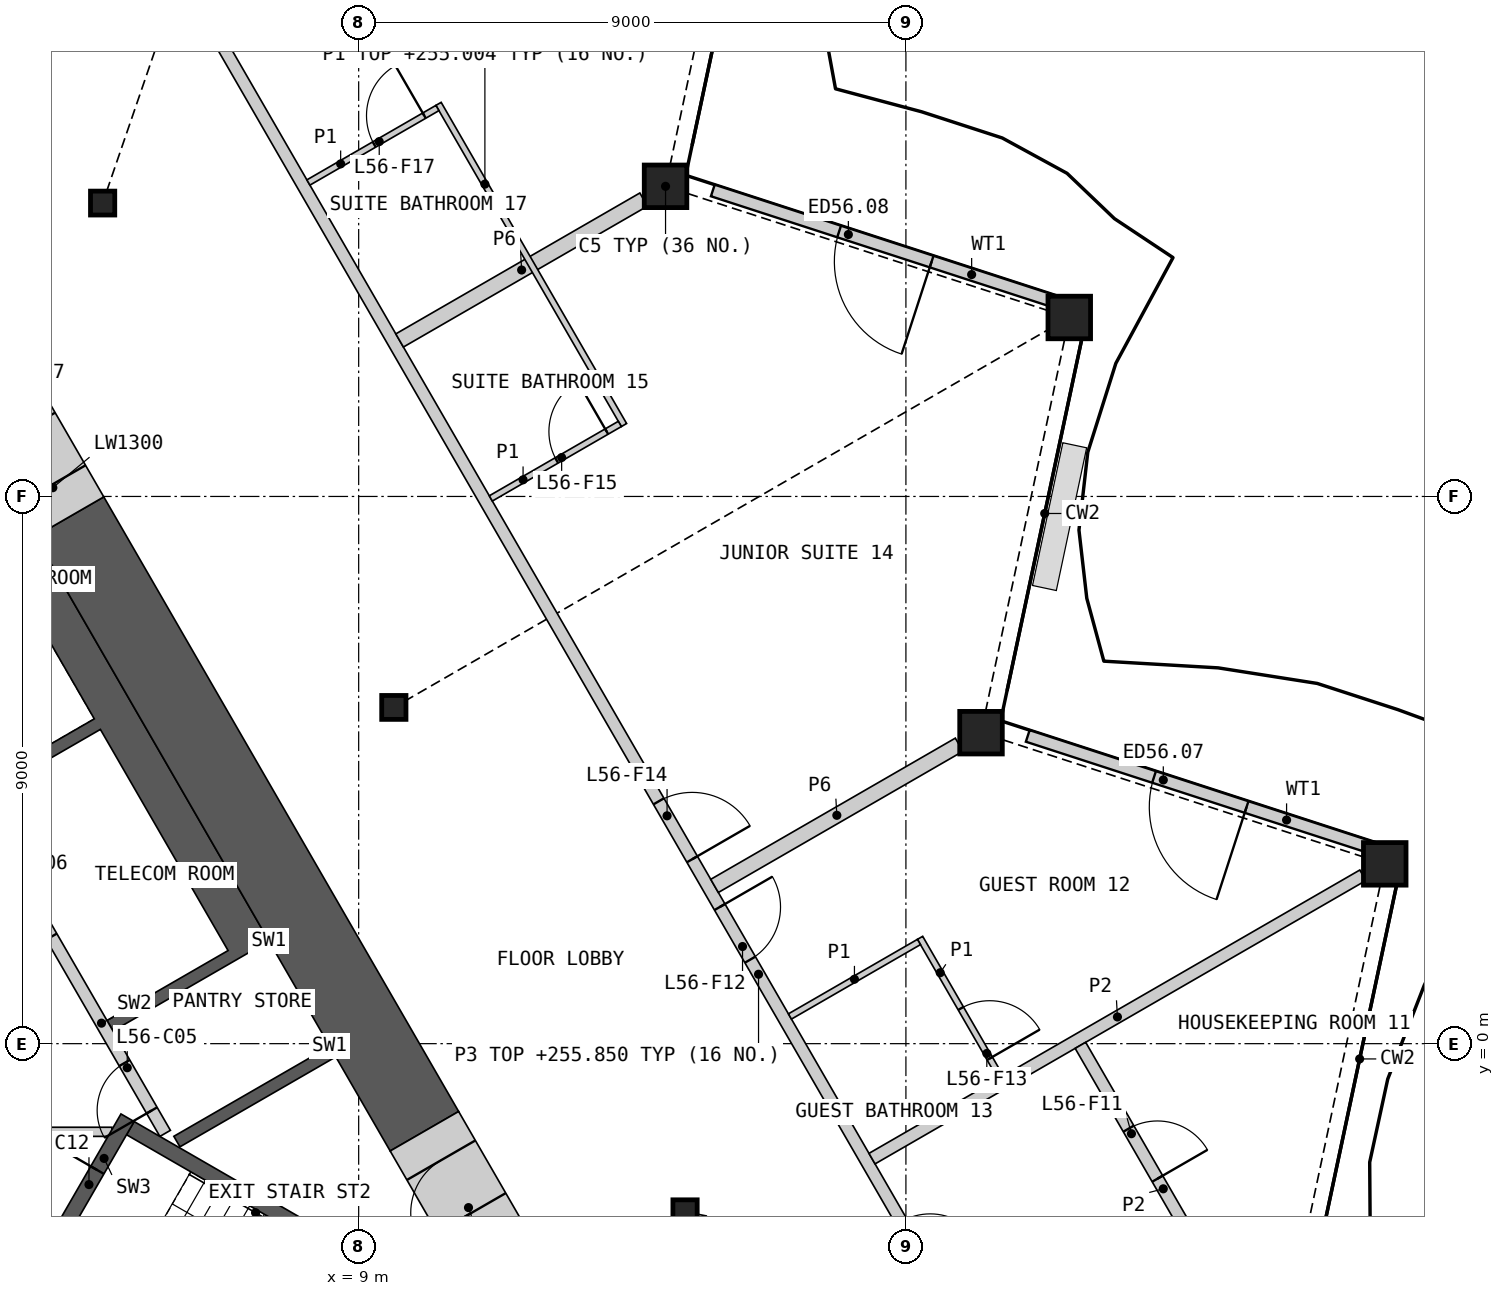
"""IFC4 building model, lengths in metres.
Left out: names, types, materials, properties, quantities, classifications, styles, units other than length and angle.
Written with IfcOpenShell. Run it as: python <this file> out.ifc"""

import sys

from ifc_helpers import new_model, si_unit, direction, frame, frame_2d, origin, origin_2d, place, context, subcontext, project, spatial, polyline, rectangle, hollow_rectangle, i_section, outline, extrude, element, fill, save


model = new_model("IFC4")
c1 = context("Model", 3, precision=1e-05, world=origin(), true_north=direction((0.0, 1.0)))
c2 = subcontext(c1, "Body", "Model", "MODEL_VIEW")
j1 = project(units=[si_unit("LENGTHUNIT", "METRE"), si_unit("PLANEANGLEUNIT", "RADIAN")], contexts=[c1])
p1 = place(None, origin())
s1 = spatial("IfcSite", under=j1, at=p1, CompositionType="ELEMENT")
p2 = place(p1, origin())
s2 = spatial("IfcBuilding", under=s1, at=p2, CompositionType="ELEMENT")
p3 = place(p2, frame((0.0, 0.0, 252.6)))
s3 = spatial("IfcBuildingStorey", under=s2, at=p3, CompositionType="ELEMENT", Elevation=252.6)
for number, where, z_axis, x_axis in (
    (1, (25.875, 2.957, 0.0), (0.0, 0.0, 1.0), (1.0, 0.0, 0.0)),
    (2, (19.235, 5.115, 0.0), (0.0, 0.0, 1.0), (1.0, 0.0, 0.0)),
    (3, (20.687, 11.943, 0.0), (0.0, 0.0, 1.0), (1.0, 0.0, 0.0)),
    (4, (14.047, 14.101, 0.0), (0.0, 0.0, 1.0), (1.0, 0.0, 0.0)),
):
    element("IfcColumn", number, at=place(p3, frame(where, z_axis=z_axis, x_axis=x_axis)), inside=s3, PredefinedType="COLUMN", context=c2, shape_type="SweptSolid", body=[
        extrude(hollow_rectangle(XDim=0.7, YDim=0.7, WallThickness=0.045, at=origin_2d()), origin(), (0.0, 0.0, 1.0), 3.6),
    ])
for number, where, z_axis, x_axis in (
    (5, (14.368, -2.765, 0.0), (0.0, 0.0, 1.0), (1.0, 0.0, 0.0)),
    (6, (9.578, 5.53, 0.0), (0.0, 0.0, 1.0), (1.0, 0.0, 0.0)),
    (7, (4.789, 13.825, 0.0), (0.0, 0.0, 1.0), (1.0, 0.0, 0.0)),
):
    element("IfcColumn", number, at=place(p3, frame(where, z_axis=z_axis, x_axis=x_axis)), inside=s3, PredefinedType="COLUMN", context=c2, shape_type="SweptSolid", body=[
        extrude(i_section(OverallWidth=0.399, OverallDepth=0.393, WebThickness=0.023, FlangeThickness=0.037, at=origin_2d()), origin(), (0.0, 0.0, 1.0), 3.6),
    ])
p4 = place(p3, frame((25.679, 3.217, 0.0), z_axis=(0.0, 0.0, 1.0), x_axis=(-0.951049400374, 0.309038894069, 0.0)))
e8 = element("IfcWall", 8, at=p4, inside=s3, PredefinedType="SOLIDWALL", context=c2, shape_type="SweptSolid", body=[
    extrude(rectangle(XDim=5.968, YDim=0.2, at=frame_2d((2.984, 0.0))), origin(), (0.0, 0.0, 1.0), 2.701),
])
p5 = place(p4, frame((2.184, 0.0, 0.0)))
e9 = element("IfcOpeningElement", 9, at=p5, cuts=e8, PredefinedType="OPENING", context=c2, shape_type="SweptSolid", body=[
    extrude(rectangle(XDim=1.6, YDim=2.4, at=frame_2d((0.8, 1.2))), frame((0.0, 0.11, 0.0), z_axis=(0.0, -1.0, 0.0), x_axis=(1.0, 0.0, 0.0)), (0.0, 0.0, 1.0), 0.22),
])
p6 = place(p3, frame((20.5, 12.188, 0.0), z_axis=(0.0, 0.0, 1.0), x_axis=(-0.951053307318, 0.309026870418, 0.0)))
e10 = element("IfcWall", 10, at=p6, inside=s3, PredefinedType="SOLIDWALL", context=c2, shape_type="SweptSolid", body=[
    extrude(rectangle(XDim=5.968, YDim=0.2, at=frame_2d((2.984, 0.0))), origin(), (0.0, 0.0, 1.0), 2.701),
])
p7 = place(p6, frame((2.184, 0.0, 0.0)))
e11 = element("IfcOpeningElement", 11, at=p7, cuts=e10, PredefinedType="OPENING", context=c2, shape_type="SweptSolid", body=[
    extrude(rectangle(XDim=1.6, YDim=2.4, at=frame_2d((0.8, 1.2))), frame((0.0, 0.11, 0.0), z_axis=(0.0, -1.0, 0.0), x_axis=(1.0, 0.0, 0.0)), (0.0, 0.0, 1.0), 0.22),
])
p8 = place(p3, origin())
e12 = element("IfcWall", 12, at=p8, inside=s3, PredefinedType="SHEAR", context=c2, shape_type="SweptSolid", body=[
    extrude(outline(polyline([(8.524, -0.044), (8.624, -0.217), (8.231, -0.444), (6.061, -1.697), (5.96, -1.524), (8.131, -0.271), (8.524, -0.044)])), origin(), (0.0, 0.0, 1.0), 3.25),
])
p9 = place(p3, origin())
e13 = element("IfcWall", 13, at=p9, inside=s3, PredefinedType="SHEAR", context=c2, shape_type="SweptSolid", body=[
    extrude(outline(polyline([(7.524, 1.688), (7.131, 1.461), (4.96, 0.208), (4.861, 0.381), (6.852, 1.531), (4.752, 5.169), (2.76, 4.019), (2.66, 4.192), (4.652, 5.342), (3.652, 7.074), (1.66, 5.924), (1.561, 6.097), (3.731, 7.35), (4.124, 7.577), (7.524, 1.688)])), origin(), (0.0, 0.0, 1.0), 3.25),
])
p10 = place(p3, frame((5.817, -1.476, 0.0), z_axis=(0.0, 0.0, 1.0), x_axis=(-0.500002616675, 0.866023893041, 0.0)))
e14 = element("IfcWall", 14, at=p10, inside=s3, PredefinedType="SOLIDWALL", context=c2, shape_type="SweptSolid", body=[
    extrude(rectangle(XDim=8.373, YDim=0.2, at=frame_2d((4.187, 0.0))), origin(), (0.0, 0.0, 1.0), 3.25),
])
p11 = place(p10, frame((0.437, 0.0, 0.0)))
e15 = element("IfcOpeningElement", 15, at=p11, cuts=e14, PredefinedType="OPENING", context=c2, shape_type="SweptSolid", body=[
    extrude(rectangle(XDim=0.9, YDim=2.1, at=frame_2d((0.45, 1.05))), frame((0.0, 0.11, 0.0), z_axis=(0.0, -1.0, 0.0), x_axis=(1.0, 0.0, 0.0)), (0.0, 0.0, 1.0), 0.22),
])
p12 = place(p10, frame((3.737, 0.0, 0.0)))
e16 = element("IfcOpeningElement", 16, at=p12, cuts=e14, PredefinedType="OPENING", context=c2, shape_type="SweptSolid", body=[
    extrude(rectangle(XDim=0.9, YDim=2.1, at=frame_2d((0.45, 1.05))), frame((0.0, 0.11, 0.0), z_axis=(0.0, -1.0, 0.0), x_axis=(1.0, 0.0, 0.0)), (0.0, 0.0, 1.0), 0.22),
])
p13 = place(p10, frame((6.937, 0.0, 0.0)))
e17 = element("IfcOpeningElement", 17, at=p13, cuts=e14, PredefinedType="OPENING", context=c2, shape_type="SweptSolid", body=[
    extrude(rectangle(XDim=1.1, YDim=2.1, at=frame_2d((0.55, 1.05))), frame((0.0, 0.11, 0.0), z_axis=(0.0, -1.0, 0.0), x_axis=(1.0, 0.0, 0.0)), (0.0, 0.0, 1.0), 0.22),
])
p14 = place(p3, frame((-4.941, -1.45, 0.0), z_axis=(0.0, 0.0, 1.0), x_axis=(1.0, 0.0, 0.0)))
e18 = element("IfcWall", 18, at=p14, inside=s3, PredefinedType="PARTITIONING", context=c2, shape_type="SweptSolid", body=[
    extrude(rectangle(XDim=9.882, YDim=0.15, at=frame_2d((4.941, 0.0))), origin(), (0.0, 0.0, 1.0), 3.25),
])
p15 = place(p14, frame((4.391, 0.0, 0.0)))
e19 = element("IfcOpeningElement", 19, at=p15, cuts=e18, PredefinedType="OPENING", context=c2, shape_type="SweptSolid", body=[
    extrude(rectangle(XDim=1.1, YDim=2.1, at=frame_2d((0.55, 1.05))), frame((0.0, 0.085, 0.0), z_axis=(0.0, -1.0, 0.0), x_axis=(1.0, 0.0, 0.0)), (0.0, 0.0, 1.0), 0.17),
])
p16 = place(p3, origin())
e20 = element("IfcWall", 20, at=p16, inside=s3, PredefinedType="SHEAR", context=c2, shape_type="SweptSolid", body=[
    extrude(outline(polyline([(10.032, -4.298), (10.374, -4.206), (5.307, -1.281), (5.182, -1.498), (10.032, -4.298)])), origin(), (0.0, 0.0, 1.0), 3.25),
])
p17 = place(p3, frame((3.655, -3.893, 0.0), z_axis=(0.0, 0.0, 1.0), x_axis=(0.499982516597, 0.866035497597, 0.0)))
e21 = element("IfcWall", 21, at=p17, inside=s3, PredefinedType="SHEAR", context=c2, shape_type="SweptSolid", body=[
    extrude(rectangle(XDim=3.088, YDim=0.25, at=frame_2d((1.544, 0.0))), origin(), (0.0, 0.0, 1.0), 3.25),
])
p18 = place(p17, frame((0.994, 0.0, 0.0)))
e22 = element("IfcOpeningElement", 22, at=p18, cuts=e21, PredefinedType="OPENING", context=c2, shape_type="SweptSolid", body=[
    extrude(rectangle(XDim=1.1, YDim=2.1, at=frame_2d((0.55, 1.05))), frame((0.0, 0.135, 0.0), z_axis=(0.0, -1.0, 0.0), x_axis=(1.0, 0.0, 0.0)), (0.0, 0.0, 1.0), 0.27),
])
p19 = place(p3, frame((10.081, -1.441, 0.0), z_axis=(0.0, 0.0, 1.0), x_axis=(-0.500006109471, 0.866021876451, 0.0)))
e23 = element("IfcWall", 23, at=p19, inside=s3, PredefinedType="SHEAR", context=c2, shape_type="SweptSolid", body=[
    extrude(rectangle(XDim=11.672, YDim=1.3, at=frame_2d((5.836, 0.0))), origin(), (0.0, 0.0, 1.0), 3.25),
])
p20 = place(p3, frame((11.181, -3.346, 0.0), z_axis=(0.0, 0.0, 1.0), x_axis=(-0.499946605688, 0.86605622881, 0.0)))
e24 = element("IfcWall", 24, at=p20, inside=s3, PredefinedType="SHEAR", context=c2, shape_type="SweptSolid", body=[
    extrude(rectangle(XDim=2.2, YDim=1.3, at=frame_2d((1.1, 0.0))), origin(), (0.0, 0.0, 1.0), 3.25),
])
p21 = place(p20, frame((0.65, 0.0, 0.0)))
e25 = element("IfcOpeningElement", 25, at=p21, cuts=e24, PredefinedType="OPENING", context=c2, shape_type="SweptSolid", body=[
    extrude(rectangle(XDim=1.0, YDim=2.1, at=frame_2d((0.5, 1.05))), frame((0.0, 0.66, 0.0), z_axis=(0.0, -1.0, 0.0), x_axis=(1.0, 0.0, 0.0)), (0.0, 0.0, 1.0), 1.32),
])
p22 = place(p3, frame((4.245, 8.668, 0.0), z_axis=(0.0, 0.0, 1.0), x_axis=(-0.50002983664, 0.866008176907, 0.0)))
e26 = element("IfcWall", 26, at=p22, inside=s3, PredefinedType="SHEAR", context=c2, shape_type="SweptSolid", body=[
    extrude(rectangle(XDim=2.2, YDim=1.3, at=frame_2d((1.1, 0.0))), origin(), (0.0, 0.0, 1.0), 3.25),
])
p23 = place(p22, frame((0.6, 0.0, 0.0)))
e27 = element("IfcOpeningElement", 27, at=p23, cuts=e26, PredefinedType="OPENING", context=c2, shape_type="SweptSolid", body=[
    extrude(rectangle(XDim=1.0, YDim=2.1, at=frame_2d((0.5, 1.05))), frame((0.0, 0.66, 0.0), z_axis=(0.0, -1.0, 0.0), x_axis=(1.0, 0.0, 0.0)), (0.0, 0.0, 1.0), 1.32),
])
p24 = place(p3, frame((5.377, 18.807, 0.0), z_axis=(0.0, 0.0, 1.0), x_axis=(0.499999852422, -0.866025488988, 0.0)))
e28 = element("IfcWall", 28, at=p24, inside=s3, PredefinedType="PARTITIONING", context=c2, shape_type="SweptSolid", body=[
    extrude(rectangle(XDim=27.198, YDim=0.2, at=frame_2d((13.599, 0.0))), origin(), (0.0, 0.0, 1.0), 3.25),
])
p25 = place(p24, frame((25.096, 0.0, 0.0)))
e29 = element("IfcOpeningElement", 29, at=p25, cuts=e28, PredefinedType="OPENING", context=c2, shape_type="SweptSolid", body=[
    extrude(rectangle(XDim=0.95, YDim=2.1, at=frame_2d((0.475, 1.05))), frame((0.0, 0.11, 0.0), z_axis=(0.0, -1.0, 0.0), x_axis=(1.0, 0.0, 0.0)), (0.0, 0.0, 1.0), 0.22),
])
p26 = place(p24, frame((19.122, 0.0, 0.0)))
e30 = element("IfcOpeningElement", 30, at=p26, cuts=e28, PredefinedType="OPENING", context=c2, shape_type="SweptSolid", body=[
    extrude(rectangle(XDim=1.0, YDim=2.1, at=frame_2d((0.5, 1.05))), frame((0.0, 0.11, 0.0), z_axis=(0.0, -1.0, 0.0), x_axis=(1.0, 0.0, 0.0)), (0.0, 0.0, 1.0), 0.22),
])
p27 = place(p24, frame((17.115, 0.0, 0.0)))
e31 = element("IfcOpeningElement", 31, at=p27, cuts=e28, PredefinedType="OPENING", context=c2, shape_type="SweptSolid", body=[
    extrude(rectangle(XDim=1.1, YDim=2.1, at=frame_2d((0.55, 1.05))), frame((0.0, 0.11, 0.0), z_axis=(0.0, -1.0, 0.0), x_axis=(1.0, 0.0, 0.0)), (0.0, 0.0, 1.0), 0.22),
])
p28 = place(p24, frame((0.35, 0.0, 0.0)))
e32 = element("IfcOpeningElement", 32, at=p28, cuts=e28, PredefinedType="OPENING", context=c2, shape_type="SweptSolid", body=[
    extrude(rectangle(XDim=1.1, YDim=2.1, at=frame_2d((0.55, 1.05))), frame((0.0, 0.11, 0.0), z_axis=(0.0, -1.0, 0.0), x_axis=(1.0, 0.0, 0.0)), (0.0, 0.0, 1.0), 0.22),
])
p29 = place(p3, frame((14.853, 2.594, 0.0), z_axis=(0.0, 0.0, 1.0), x_axis=(0.866021891294, 0.500006083763, 0.0)))
e33 = element("IfcWall", 33, at=p29, inside=s3, PredefinedType="PARTITIONING", context=c2, shape_type="SweptSolid", body=[
    extrude(rectangle(XDim=4.645, YDim=0.25, at=frame_2d((2.322, 0.0))), origin(), (0.0, 0.0, 1.0), 2.404),
])
p30 = place(p3, frame((9.673, 11.566, 0.0), z_axis=(0.0, 0.0, 1.0), x_axis=(0.866039966287, 0.499974776157, 0.0)))
e34 = element("IfcWall", 34, at=p30, inside=s3, PredefinedType="PARTITIONING", context=c2, shape_type="SweptSolid", body=[
    extrude(rectangle(XDim=4.635, YDim=0.25, at=frame_2d((2.317, 0.0))), origin(), (0.0, 0.0, 1.0), 2.404),
])
p31 = place(p3, frame((17.443, -1.891, 0.0), z_axis=(0.0, 0.0, 1.0), x_axis=(0.866019838429, 0.500009639354, 0.0)))
e35 = element("IfcWall", 35, at=p31, inside=s3, PredefinedType="PARTITIONING", context=c2, shape_type="SweptSolid", body=[
    extrude(rectangle(XDim=9.321, YDim=0.2, at=frame_2d((4.661, 0.0))), origin(), (0.0, 0.0, 1.0), 2.404),
])
p32 = place(p3, frame((20.87, -0.028, 0.0), z_axis=(0.0, 0.0, 1.0), x_axis=(0.499993928037, -0.866028909405, 0.0)))
e36 = element("IfcWall", 36, at=p32, inside=s3, PredefinedType="PARTITIONING", context=c2, shape_type="SweptSolid", body=[
    extrude(rectangle(XDim=5.449, YDim=0.2, at=frame_2d((2.725, 0.0))), origin(), (0.0, 0.0, 1.0), 2.404),
])
p33 = place(p32, frame((1.583, 0.0, 0.0)))
e37 = element("IfcOpeningElement", 37, at=p33, cuts=e36, PredefinedType="OPENING", context=c2, shape_type="SweptSolid", body=[
    extrude(rectangle(XDim=0.95, YDim=2.1, at=frame_2d((0.475, 1.05))), frame((0.0, 0.11, 0.0), z_axis=(0.0, -1.0, 0.0), x_axis=(1.0, 0.0, 0.0)), (0.0, 0.0, 1.0), 0.22),
])
p34 = place(p3, frame((10.313, 15.457, 0.0), z_axis=(0.0, 0.0, 1.0), x_axis=(0.499978833458, -0.866037623948, 0.0)))
e38 = element("IfcWall", 38, at=p34, inside=s3, PredefinedType="PARTITIONING", context=c2, shape_type="SweptSolid", body=[
    extrude(rectangle(XDim=6.1, YDim=0.1, at=frame_2d((3.05, 0.0))), origin(), (0.0, 0.0, 1.0), 2.404),
])
p35 = place(p3, frame((18.233, 1.74, 0.0), z_axis=(0.0, 0.0, 1.0), x_axis=(0.499993606316, -0.866029095148, 0.0)))
e39 = element("IfcWall", 39, at=p35, inside=s3, PredefinedType="PARTITIONING", context=c2, shape_type="SweptSolid", body=[
    extrude(rectangle(XDim=2.65, YDim=0.1, at=frame_2d((1.325, 0.0))), origin(), (0.0, 0.0, 1.0), 2.404),
])
p36 = place(p35, frame((1.341, 0.0, 0.0)))
e40 = element("IfcOpeningElement", 40, at=p36, cuts=e39, PredefinedType="OPENING", context=c2, shape_type="SweptSolid", body=[
    extrude(rectangle(XDim=0.95, YDim=2.1, at=frame_2d((0.475, 1.05))), frame((0.0, 0.06, 0.0), z_axis=(0.0, -1.0, 0.0), x_axis=(1.0, 0.0, 0.0)), (0.0, 0.0, 1.0), 0.12),
])
p37 = place(p3, frame((16.093, 0.447, 0.0), z_axis=(0.0, 0.0, 1.0), x_axis=(0.866057815567, 0.499943856944, 0.0)))
e41 = element("IfcWall", 41, at=p37, inside=s3, PredefinedType="PARTITIONING", context=c2, shape_type="SweptSolid", body=[
    extrude(rectangle(XDim=2.45, YDim=0.1, at=frame_2d((1.225, 0.0))), origin(), (0.0, 0.0, 1.0), 2.404),
])
p38 = place(p3, frame((11.173, 8.968, 0.0), z_axis=(0.0, 0.0, 1.0), x_axis=(0.866014668023, 0.500018594424, 0.0)))
e42 = element("IfcWall", 42, at=p38, inside=s3, PredefinedType="PARTITIONING", context=c2, shape_type="SweptSolid", body=[
    extrude(rectangle(XDim=2.45, YDim=0.1, at=frame_2d((1.225, 0.0))), origin(), (0.0, 0.0, 1.0), 2.404),
])
p39 = place(p38, frame((1.25, 0.0, 0.0)))
e43 = element("IfcOpeningElement", 43, at=p39, cuts=e42, PredefinedType="OPENING", context=c2, shape_type="SweptSolid", body=[
    extrude(rectangle(XDim=0.95, YDim=2.1, at=frame_2d((0.475, 1.05))), frame((0.0, 0.06, 0.0), z_axis=(0.0, -1.0, 0.0), x_axis=(1.0, 0.0, 0.0)), (0.0, 0.0, 1.0), 0.12),
])
p40 = place(p3, frame((8.173, 14.164, 0.0), z_axis=(0.0, 0.0, 1.0), x_axis=(0.866014668023, 0.500018594424, 0.0)))
e44 = element("IfcWall", 44, at=p40, inside=s3, PredefinedType="PARTITIONING", context=c2, shape_type="SweptSolid", body=[
    extrude(rectangle(XDim=2.45, YDim=0.1, at=frame_2d((1.225, 0.0))), origin(), (0.0, 0.0, 1.0), 2.404),
])
p41 = place(p40, frame((1.25, 0.0, 0.0)))
e45 = element("IfcOpeningElement", 45, at=p41, cuts=e44, PredefinedType="OPENING", context=c2, shape_type="SweptSolid", body=[
    extrude(rectangle(XDim=0.95, YDim=2.1, at=frame_2d((0.475, 1.05))), frame((0.0, 0.06, 0.0), z_axis=(0.0, -1.0, 0.0), x_axis=(1.0, 0.0, 0.0)), (0.0, 0.0, 1.0), 0.12),
])
p42 = place(p5, origin())
e46 = element("IfcDoor", 46, at=p42, inside=s3, OperationType="DOUBLE_DOOR_SINGLE_SWING", PredefinedType="DOOR", context=c2, shape_type="SweptSolid", body=[
    extrude(rectangle(XDim=1.6, YDim=2.4, at=frame_2d((0.8, 1.2))), frame((0.0, 0.025, 0.0), z_axis=(0.0, -1.0, 0.0), x_axis=(1.0, 0.0, 0.0)), (0.0, 0.0, 1.0), 0.05),
])
fill(e9, e46)
p43 = place(p7, origin())
e47 = element("IfcDoor", 47, at=p43, inside=s3, OperationType="DOUBLE_DOOR_SINGLE_SWING", PredefinedType="DOOR", context=c2, shape_type="SweptSolid", body=[
    extrude(rectangle(XDim=1.6, YDim=2.4, at=frame_2d((0.8, 1.2))), frame((0.0, 0.025, 0.0), z_axis=(0.0, -1.0, 0.0), x_axis=(1.0, 0.0, 0.0)), (0.0, 0.0, 1.0), 0.05),
])
fill(e11, e47)
p44 = place(p11, origin())
e48 = element("IfcDoor", 48, at=p44, inside=s3, OperationType="SINGLE_SWING_LEFT", PredefinedType="DOOR", context=c2, shape_type="SweptSolid", body=[
    extrude(rectangle(XDim=0.9, YDim=2.1, at=frame_2d((0.45, 1.05))), frame((0.0, 0.025, 0.0), z_axis=(0.0, -1.0, 0.0), x_axis=(1.0, 0.0, 0.0)), (0.0, 0.0, 1.0), 0.05),
])
fill(e15, e48)
p45 = place(p12, origin())
e49 = element("IfcDoor", 49, at=p45, inside=s3, OperationType="SINGLE_SWING_LEFT", PredefinedType="DOOR", context=c2, shape_type="SweptSolid", body=[
    extrude(rectangle(XDim=0.9, YDim=2.1, at=frame_2d((0.45, 1.05))), frame((0.0, 0.025, 0.0), z_axis=(0.0, -1.0, 0.0), x_axis=(1.0, 0.0, 0.0)), (0.0, 0.0, 1.0), 0.05),
])
fill(e16, e49)
p46 = place(p18, origin())
e50 = element("IfcDoor", 50, at=p46, inside=s3, OperationType="SINGLE_SWING_RIGHT", PredefinedType="DOOR", context=c2, shape_type="SweptSolid", body=[
    extrude(rectangle(XDim=1.1, YDim=2.1, at=frame_2d((0.55, 1.05))), frame((0.0, 0.025, 0.0), z_axis=(0.0, -1.0, 0.0), x_axis=(1.0, 0.0, 0.0)), (0.0, 0.0, 1.0), 0.05),
])
fill(e22, e50)
p47 = place(p21, origin())
e51 = element("IfcDoor", 51, at=p47, inside=s3, OperationType="SINGLE_SWING_LEFT", PredefinedType="DOOR", context=c2, shape_type="SweptSolid", body=[
    extrude(rectangle(XDim=1.0, YDim=2.1, at=frame_2d((0.5, 1.05))), frame((0.0, 0.405, 0.0), z_axis=(0.0, -1.0, 0.0), x_axis=(1.0, 0.0, 0.0)), (0.0, 0.0, 1.0), 0.05),
])
fill(e25, e51)
p48 = place(p33, origin())
e52 = element("IfcDoor", 52, at=p48, inside=s3, OperationType="SINGLE_SWING_RIGHT", PredefinedType="DOOR", context=c2, shape_type="SweptSolid", body=[
    extrude(rectangle(XDim=0.95, YDim=2.1, at=frame_2d((0.475, 1.05))), frame((0.0, 0.025, 0.0), z_axis=(0.0, -1.0, 0.0), x_axis=(1.0, 0.0, 0.0)), (0.0, 0.0, 1.0), 0.05),
])
fill(e37, e52)
p49 = place(p26, origin())
e53 = element("IfcDoor", 53, at=p49, inside=s3, OperationType="SINGLE_SWING_LEFT", PredefinedType="DOOR", context=c2, shape_type="SweptSolid", body=[
    extrude(rectangle(XDim=1.0, YDim=2.1, at=frame_2d((0.5, 1.05))), frame((0.0, 0.025, 0.0), z_axis=(0.0, -1.0, 0.0), x_axis=(1.0, 0.0, 0.0)), (0.0, 0.0, 1.0), 0.05),
])
fill(e30, e53)
p50 = place(p36, origin())
e54 = element("IfcDoor", 54, at=p50, inside=s3, OperationType="SINGLE_SWING_RIGHT", PredefinedType="DOOR", context=c2, shape_type="SweptSolid", body=[
    extrude(rectangle(XDim=0.95, YDim=2.1, at=frame_2d((0.475, 1.05))), frame((0.0, 0.025, 0.0), z_axis=(0.0, -1.0, 0.0), x_axis=(1.0, 0.0, 0.0)), (0.0, 0.0, 1.0), 0.05),
])
fill(e40, e54)
p51 = place(p27, origin())
e55 = element("IfcDoor", 55, at=p51, inside=s3, OperationType="SINGLE_SWING_RIGHT", PredefinedType="DOOR", context=c2, shape_type="SweptSolid", body=[
    extrude(rectangle(XDim=1.1, YDim=2.1, at=frame_2d((0.55, 1.05))), frame((0.0, 0.025, 0.0), z_axis=(0.0, -1.0, 0.0), x_axis=(1.0, 0.0, 0.0)), (0.0, 0.0, 1.0), 0.05),
])
fill(e31, e55)
p52 = place(p39, origin())
e56 = element("IfcDoor", 56, at=p52, inside=s3, OperationType="SINGLE_SWING_RIGHT", PredefinedType="DOOR", context=c2, shape_type="SweptSolid", body=[
    extrude(rectangle(XDim=0.95, YDim=2.1, at=frame_2d((0.475, 1.05))), frame((0.0, 0.025, 0.0), z_axis=(0.0, -1.0, 0.0), x_axis=(1.0, 0.0, 0.0)), (0.0, 0.0, 1.0), 0.05),
])
fill(e43, e56)
p53 = place(p41, origin())
e57 = element("IfcDoor", 57, at=p53, inside=s3, OperationType="SINGLE_SWING_RIGHT", PredefinedType="DOOR", context=c2, shape_type="SweptSolid", body=[
    extrude(rectangle(XDim=0.95, YDim=2.1, at=frame_2d((0.475, 1.05))), frame((0.0, 0.025, 0.0), z_axis=(0.0, -1.0, 0.0), x_axis=(1.0, 0.0, 0.0)), (0.0, 0.0, 1.0), 0.05),
])
fill(e45, e57)
save(model, sys.argv[1])
